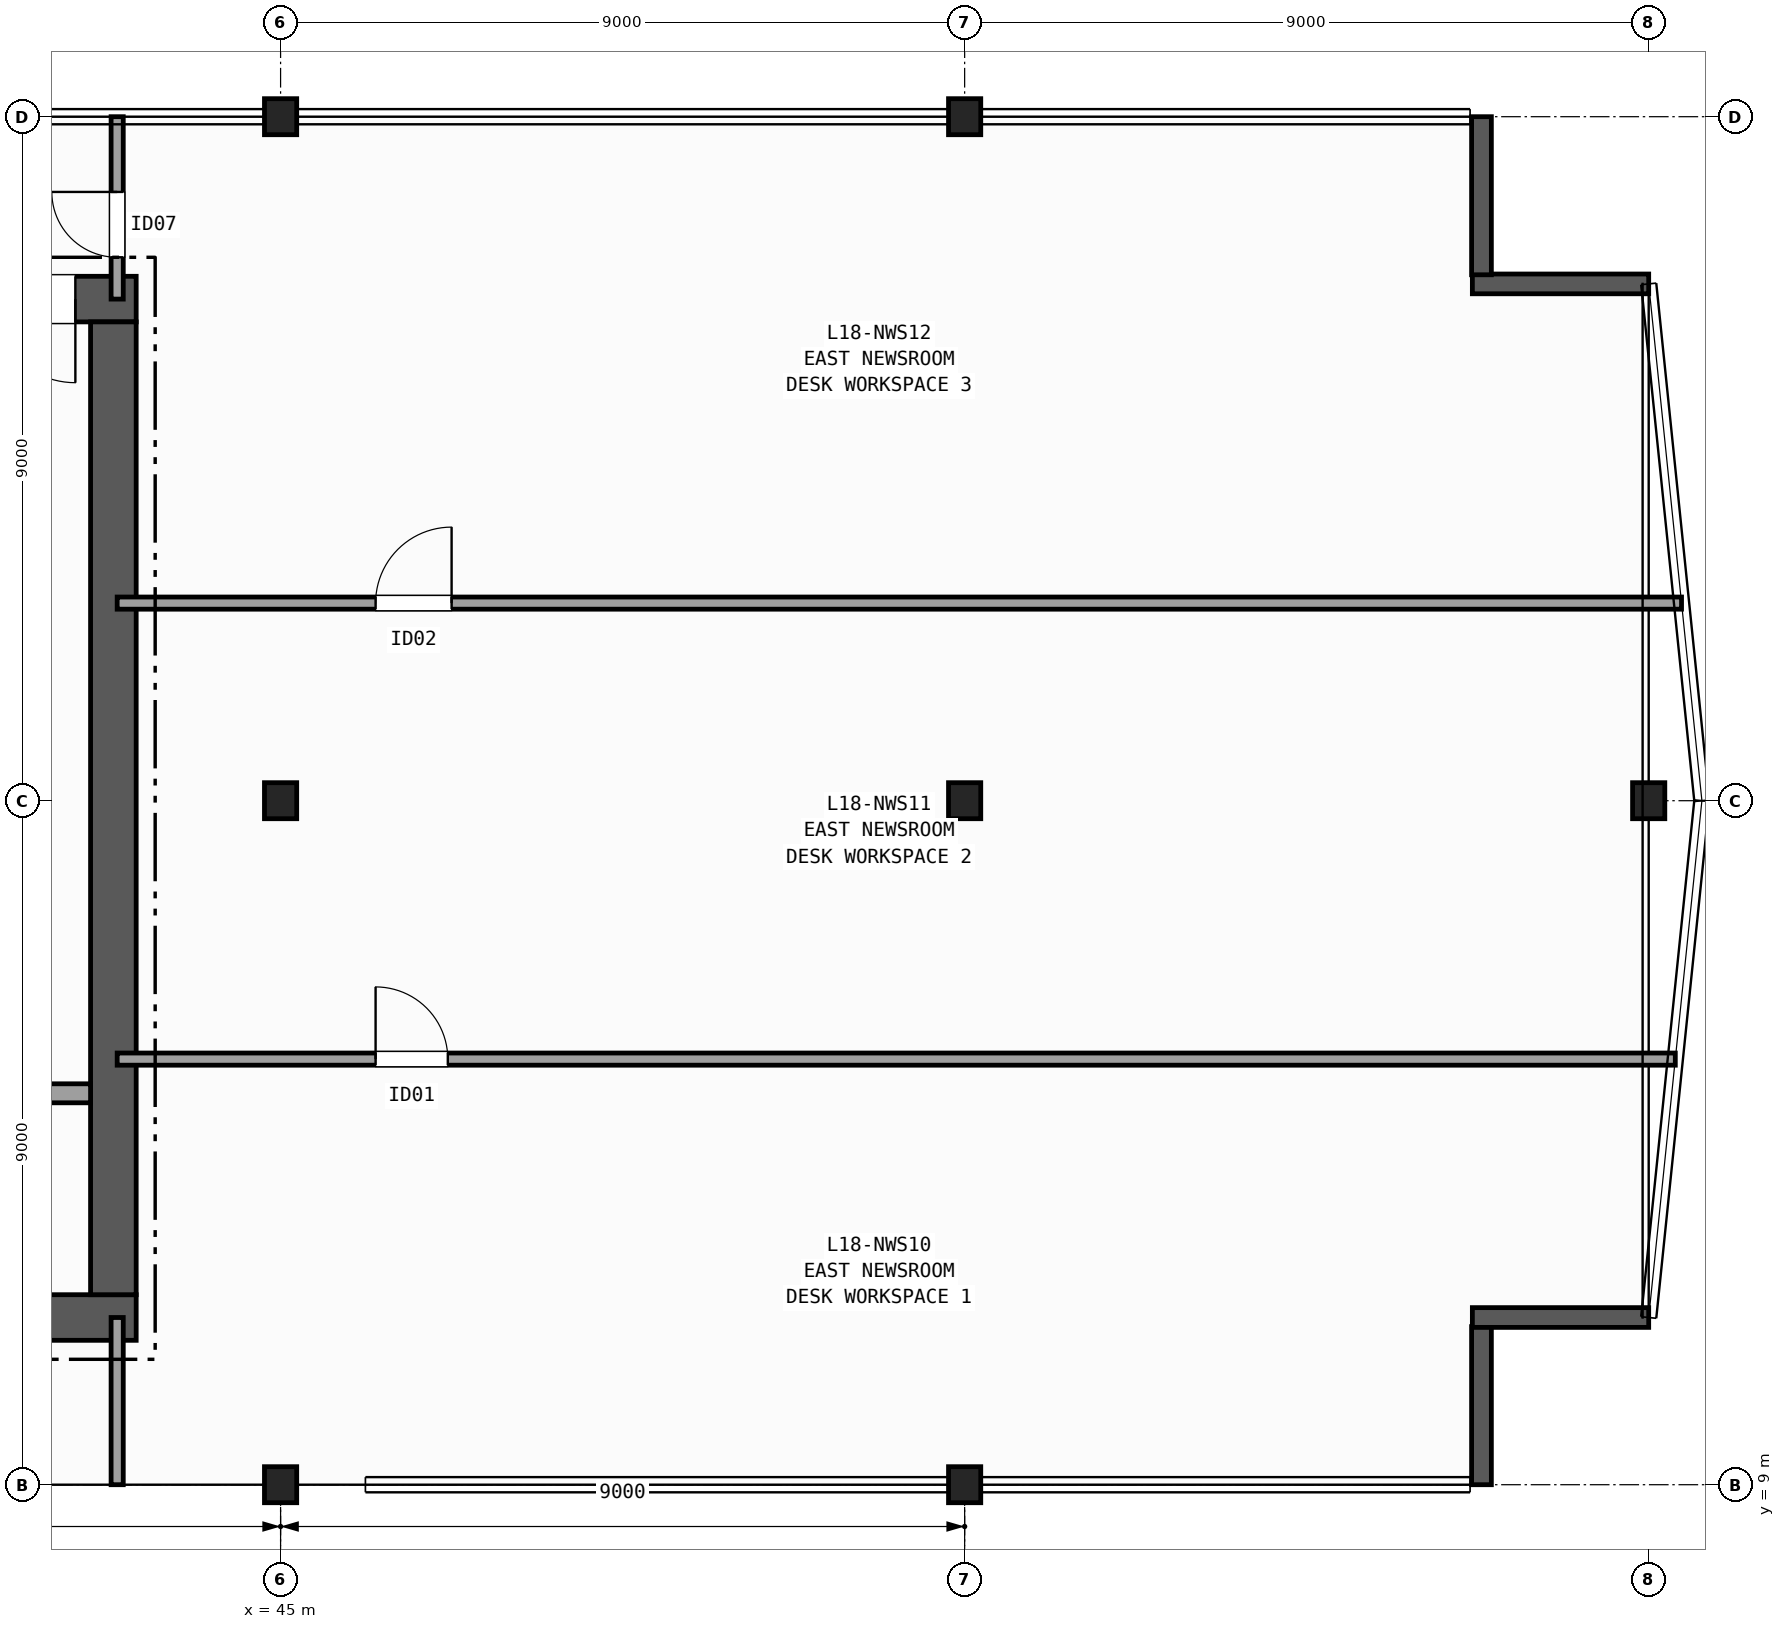
"""IFC4 building model, lengths in metres.
Left out: names, types, materials, properties, quantities, classifications, styles, units other than length and angle.
Written with IfcOpenShell. Run it as: python <this file> out.ifc"""

import sys

from ifc_helpers import new_model, si_unit, direction, frame, frame_2d, origin, origin_2d, place, context, subcontext, project, spatial, rectangle, i_section, extrude, element, fill, save


model = new_model("IFC4")
c1 = context("Model", 3, precision=1e-05, world=origin(), true_north=direction((0.0, 1.0)))
c2 = subcontext(c1, "Body", "Model", "MODEL_VIEW")
j1 = project(units=[si_unit("LENGTHUNIT", "METRE"), si_unit("PLANEANGLEUNIT", "RADIAN")], contexts=[c1])
p1 = place(None, origin())
s1 = spatial("IfcSite", under=j1, at=p1, CompositionType="ELEMENT")
p2 = place(p1, origin())
s2 = spatial("IfcBuilding", under=s1, at=p2, CompositionType="ELEMENT")
p3 = place(p2, frame((0.0, 0.0, 76.7)))
s3 = spatial("IfcBuildingStorey", under=s2, at=p3, CompositionType="ELEMENT", Elevation=76.7)
for number, where, z_axis, x_axis in (
    (1, (45.0, 9.0, 0.0), (0.0, 0.0, 1.0), (1.0, 0.0, 0.0)),
    (2, (45.0, 18.0, 0.0), (0.0, 0.0, 1.0), (1.0, 0.0, 0.0)),
    (3, (45.0, 27.0, 0.0), (0.0, 0.0, 1.0), (1.0, 0.0, 0.0)),
    (4, (54.0, 9.0, 0.0), (0.0, 0.0, 1.0), (1.0, 0.0, 0.0)),
    (5, (54.0, 18.0, 0.0), (0.0, 0.0, 1.0), (1.0, 0.0, 0.0)),
    (6, (54.0, 27.0, 0.0), (0.0, 0.0, 1.0), (1.0, 0.0, 0.0)),
    (7, (63.0, 18.0, 0.0), (0.0, 0.0, 1.0), (1.0, 0.0, 0.0)),
):
    element("IfcColumn", number, at=place(p3, frame(where, z_axis=z_axis, x_axis=x_axis)), inside=s3, PredefinedType="COLUMN", context=c2, shape_type="SweptSolid", body=[
        extrude(i_section(OverallWidth=0.424, OverallDepth=0.474, WebThickness=0.048, FlangeThickness=0.077, FilletRadius=0.015, at=origin_2d()), origin(), (0.0, 0.0, 1.0), 3.7),
    ])
p4 = place(p3, frame((60.8, 9.0, 0.0), z_axis=(0.0, 0.0, 1.0), x_axis=(0.0, 1.0, 0.0)))
e8 = element("IfcWall", 8, at=p4, inside=s3, PredefinedType="SOLIDWALL", context=c2, shape_type="SweptSolid", body=[
    extrude(rectangle(XDim=2.08, YDim=0.26, at=frame_2d((1.04, 0.0))), origin(), (0.0, 0.0, 1.0), 3.42),
])
for number, where, z_axis, x_axis in (
    (9, (60.68, 11.2, 0.0), (0.0, 0.0, 1.0), (1.0, 0.0, 0.0)),
    (10, (63.0, 24.8, 0.0), (0.0, 0.0, 1.0), (-1.0, 0.0, 0.0)),
):
    element("IfcWall", number, at=place(p3, frame(where, z_axis=z_axis, x_axis=x_axis)), inside=s3, PredefinedType="SOLIDWALL", context=c2, shape_type="SweptSolid", body=[
        extrude(rectangle(XDim=2.32, YDim=0.26, at=frame_2d((1.16, 0.0))), origin(), (0.0, 0.0, 1.0), 3.42),
    ])
p5 = place(p3, frame((60.8, 24.92, 0.0), z_axis=(0.0, 0.0, 1.0), x_axis=(0.0, 1.0, 0.0)))
e11 = element("IfcWall", 11, at=p5, inside=s3, PredefinedType="SOLIDWALL", context=c2, shape_type="SweptSolid", body=[
    extrude(rectangle(XDim=2.08, YDim=0.26, at=frame_2d((1.04, 0.0))), origin(), (0.0, 0.0, 1.0), 3.42),
])
p6 = place(p3, frame((29.1, 11.2, 0.0), z_axis=(0.0, 0.0, 1.0), x_axis=(1.0, 0.0, 0.0)))
e12 = element("IfcWall", 12, at=p6, inside=s3, PredefinedType="SHEAR", context=c2, shape_type="SweptSolid", body=[
    extrude(rectangle(XDim=14.0, YDim=0.6, at=frame_2d((7.0, 0.0))), origin(), (0.0, 0.0, 1.0), 3.42),
])
p7 = place(p3, frame((43.1, 24.6, 0.0), z_axis=(0.0, 0.0, 1.0), x_axis=(-1.0, 0.0, 0.0)))
e13 = element("IfcWall", 13, at=p7, inside=s3, PredefinedType="SHEAR", context=c2, shape_type="SweptSolid", body=[
    extrude(rectangle(XDim=14.0, YDim=0.6, at=frame_2d((7.0, 0.0))), origin(), (0.0, 0.0, 1.0), 3.42),
])
p8 = place(p7, frame((0.8, 0.0, 0.0)))
e14 = element("IfcOpeningElement", 14, at=p8, cuts=e13, PredefinedType="OPENING", context=c2, shape_type="SweptSolid", body=[
    extrude(rectangle(XDim=1.1, YDim=2.15, at=frame_2d((0.55, 1.075))), frame((0.0, 0.31, 0.0), z_axis=(0.0, -1.0, 0.0), x_axis=(1.0, 0.0, 0.0)), (0.0, 0.0, 1.0), 0.62),
])
p9 = place(p7, frame((2.75, 0.0, 0.0)))
e15 = element("IfcOpeningElement", 15, at=p9, cuts=e13, PredefinedType="OPENING", context=c2, shape_type="SweptSolid", body=[
    extrude(rectangle(XDim=0.9, YDim=2.1, at=frame_2d((0.45, 1.05))), frame((0.0, 0.31, 0.0), z_axis=(0.0, -1.0, 0.0), x_axis=(1.0, 0.0, 0.0)), (0.0, 0.0, 1.0), 0.62),
])
p10 = place(p7, frame((4.65, 0.0, 0.0)))
e16 = element("IfcOpeningElement", 16, at=p10, cuts=e13, PredefinedType="OPENING", context=c2, shape_type="SweptSolid", body=[
    extrude(rectangle(XDim=0.9, YDim=2.1, at=frame_2d((0.45, 1.05))), frame((0.0, 0.31, 0.0), z_axis=(0.0, -1.0, 0.0), x_axis=(1.0, 0.0, 0.0)), (0.0, 0.0, 1.0), 0.62),
])
p11 = place(p3, frame((42.8, 11.5, 0.0), z_axis=(0.0, 0.0, 1.0), x_axis=(0.0, 1.0, 0.0)))
e17 = element("IfcWall", 17, at=p11, inside=s3, PredefinedType="SHEAR", context=c2, shape_type="SweptSolid", body=[
    extrude(rectangle(XDim=12.8, YDim=0.6, at=frame_2d((6.4, 0.0))), origin(), (0.0, 0.0, 1.0), 3.42),
])
p12 = place(p3, frame((33.07, 14.15, 0.0), z_axis=(0.0, 0.0, 1.0), x_axis=(1.0, 0.0, 0.0)))
e18 = element("IfcWall", 18, at=p12, inside=s3, PredefinedType="PARTITIONING", context=c2, shape_type="SweptSolid", body=[
    extrude(rectangle(XDim=9.43, YDim=0.25, at=frame_2d((4.715, 0.0))), origin(), (0.0, 0.0, 1.0), 3.42),
])
p13 = place(p12, frame((0.755, 0.0, 0.0)))
e19 = element("IfcOpeningElement", 19, at=p13, cuts=e18, PredefinedType="OPENING", context=c2, shape_type="SweptSolid", body=[
    extrude(rectangle(XDim=1.15, YDim=2.15, at=frame_2d((0.575, 1.075))), frame((0.0, 0.135, 0.0), z_axis=(0.0, -1.0, 0.0), x_axis=(1.0, 0.0, 0.0)), (0.0, 0.0, 1.0), 0.27),
])
p14 = place(p12, frame((3.355, 0.0, 0.0)))
e20 = element("IfcOpeningElement", 20, at=p14, cuts=e18, PredefinedType="OPENING", context=c2, shape_type="SweptSolid", body=[
    extrude(rectangle(XDim=1.15, YDim=2.15, at=frame_2d((0.575, 1.075))), frame((0.0, 0.135, 0.0), z_axis=(0.0, -1.0, 0.0), x_axis=(1.0, 0.0, 0.0)), (0.0, 0.0, 1.0), 0.27),
])
p15 = place(p3, frame((42.85, 9.0, 0.0), z_axis=(0.0, 0.0, 1.0), x_axis=(0.0, 1.0, 0.0)))
e21 = element("IfcWall", 21, at=p15, inside=s3, PredefinedType="PARTITIONING", context=c2, shape_type="SweptSolid", body=[
    extrude(rectangle(XDim=2.2, YDim=0.16, at=frame_2d((1.1, 0.0))), origin(), (0.0, 0.0, 1.0), 2.627),
])
p16 = place(p3, frame((42.85, 24.6, 0.0), z_axis=(0.0, 0.0, 1.0), x_axis=(0.0, 1.0, 0.0)))
e22 = element("IfcWall", 22, at=p16, inside=s3, PredefinedType="PARTITIONING", context=c2, shape_type="SweptSolid", body=[
    extrude(rectangle(XDim=2.4, YDim=0.16, at=frame_2d((1.2, 0.0))), origin(), (0.0, 0.0, 1.0), 2.627),
])
p17 = place(p16, frame((0.55, 0.0, 0.0)))
e23 = element("IfcOpeningElement", 23, at=p17, cuts=e22, PredefinedType="OPENING", context=c2, shape_type="SweptSolid", body=[
    extrude(rectangle(XDim=0.86, YDim=2.05, at=frame_2d((0.43, 1.025))), frame((0.0, 0.09, 0.0), z_axis=(0.0, -1.0, 0.0), x_axis=(1.0, 0.0, 0.0)), (0.0, 0.0, 1.0), 0.18),
])
p18 = place(p3, frame((42.85, 14.6, 0.0), z_axis=(0.0, 0.0, 1.0), x_axis=(1.0, 0.0, 0.0)))
e24 = element("IfcWall", 24, at=p18, inside=s3, PredefinedType="PARTITIONING", context=c2, shape_type="SweptSolid", body=[
    extrude(rectangle(XDim=20.5, YDim=0.16, at=frame_2d((10.25, 0.0))), origin(), (0.0, 0.0, 1.0), 3.42),
])
p19 = place(p18, frame((3.4, 0.0, 0.0)))
e25 = element("IfcOpeningElement", 25, at=p19, cuts=e24, PredefinedType="OPENING", context=c2, shape_type="SweptSolid", body=[
    extrude(rectangle(XDim=0.95, YDim=2.1, at=frame_2d((0.475, 1.05))), frame((0.0, 0.09, 0.0), z_axis=(0.0, -1.0, 0.0), x_axis=(1.0, 0.0, 0.0)), (0.0, 0.0, 1.0), 0.18),
])
p20 = place(p3, frame((42.85, 20.6, 0.0), z_axis=(0.0, 0.0, 1.0), x_axis=(1.0, 0.0, 0.0)))
e26 = element("IfcWall", 26, at=p20, inside=s3, PredefinedType="PARTITIONING", context=c2, shape_type="SweptSolid", body=[
    extrude(rectangle(XDim=20.582, YDim=0.16, at=frame_2d((10.291, 0.0))), origin(), (0.0, 0.0, 1.0), 3.42),
])
p21 = place(p20, frame((3.4, 0.0, 0.0)))
e27 = element("IfcOpeningElement", 27, at=p21, cuts=e26, PredefinedType="OPENING", context=c2, shape_type="SweptSolid", body=[
    extrude(rectangle(XDim=1.0, YDim=2.1, at=frame_2d((0.5, 1.05))), frame((0.0, 0.09, 0.0), z_axis=(0.0, -1.0, 0.0), x_axis=(1.0, 0.0, 0.0)), (0.0, 0.0, 1.0), 0.18),
])
p22 = place(p8, origin())
e28 = element("IfcDoor", 28, at=p22, inside=s3, OperationType="SINGLE_SWING_LEFT", PredefinedType="DOOR", context=c2, shape_type="SweptSolid", body=[
    extrude(rectangle(XDim=1.1, YDim=2.15, at=frame_2d((0.55, 1.075))), frame((0.0, 0.025, 0.0), z_axis=(0.0, -1.0, 0.0), x_axis=(1.0, 0.0, 0.0)), (0.0, 0.0, 1.0), 0.05),
])
fill(e14, e28)
p23 = place(p17, origin())
e29 = element("IfcDoor", 29, at=p23, inside=s3, OperationType="SINGLE_SWING_RIGHT", PredefinedType="DOOR", context=c2, shape_type="SweptSolid", body=[
    extrude(rectangle(XDim=0.86, YDim=2.05, at=frame_2d((0.43, 1.025))), frame((0.0, 0.025, 0.0), z_axis=(0.0, -1.0, 0.0), x_axis=(1.0, 0.0, 0.0)), (0.0, 0.0, 1.0), 0.05),
])
fill(e23, e29)
p24 = place(p19, origin())
e30 = element("IfcDoor", 30, at=p24, inside=s3, OperationType="SINGLE_SWING_LEFT", PredefinedType="DOOR", context=c2, shape_type="SweptSolid", body=[
    extrude(rectangle(XDim=0.95, YDim=2.1, at=frame_2d((0.475, 1.05))), frame((0.0, 0.025, 0.0), z_axis=(0.0, -1.0, 0.0), x_axis=(1.0, 0.0, 0.0)), (0.0, 0.0, 1.0), 0.05),
])
fill(e25, e30)
p25 = place(p21, origin())
e31 = element("IfcDoor", 31, at=p25, inside=s3, OperationType="SINGLE_SWING_RIGHT", PredefinedType="DOOR", context=c2, shape_type="SweptSolid", body=[
    extrude(rectangle(XDim=1.0, YDim=2.1, at=frame_2d((0.5, 1.05))), frame((0.0, 0.025, 0.0), z_axis=(0.0, -1.0, 0.0), x_axis=(1.0, 0.0, 0.0)), (0.0, 0.0, 1.0), 0.05),
])
fill(e27, e31)
save(model, sys.argv[1])
